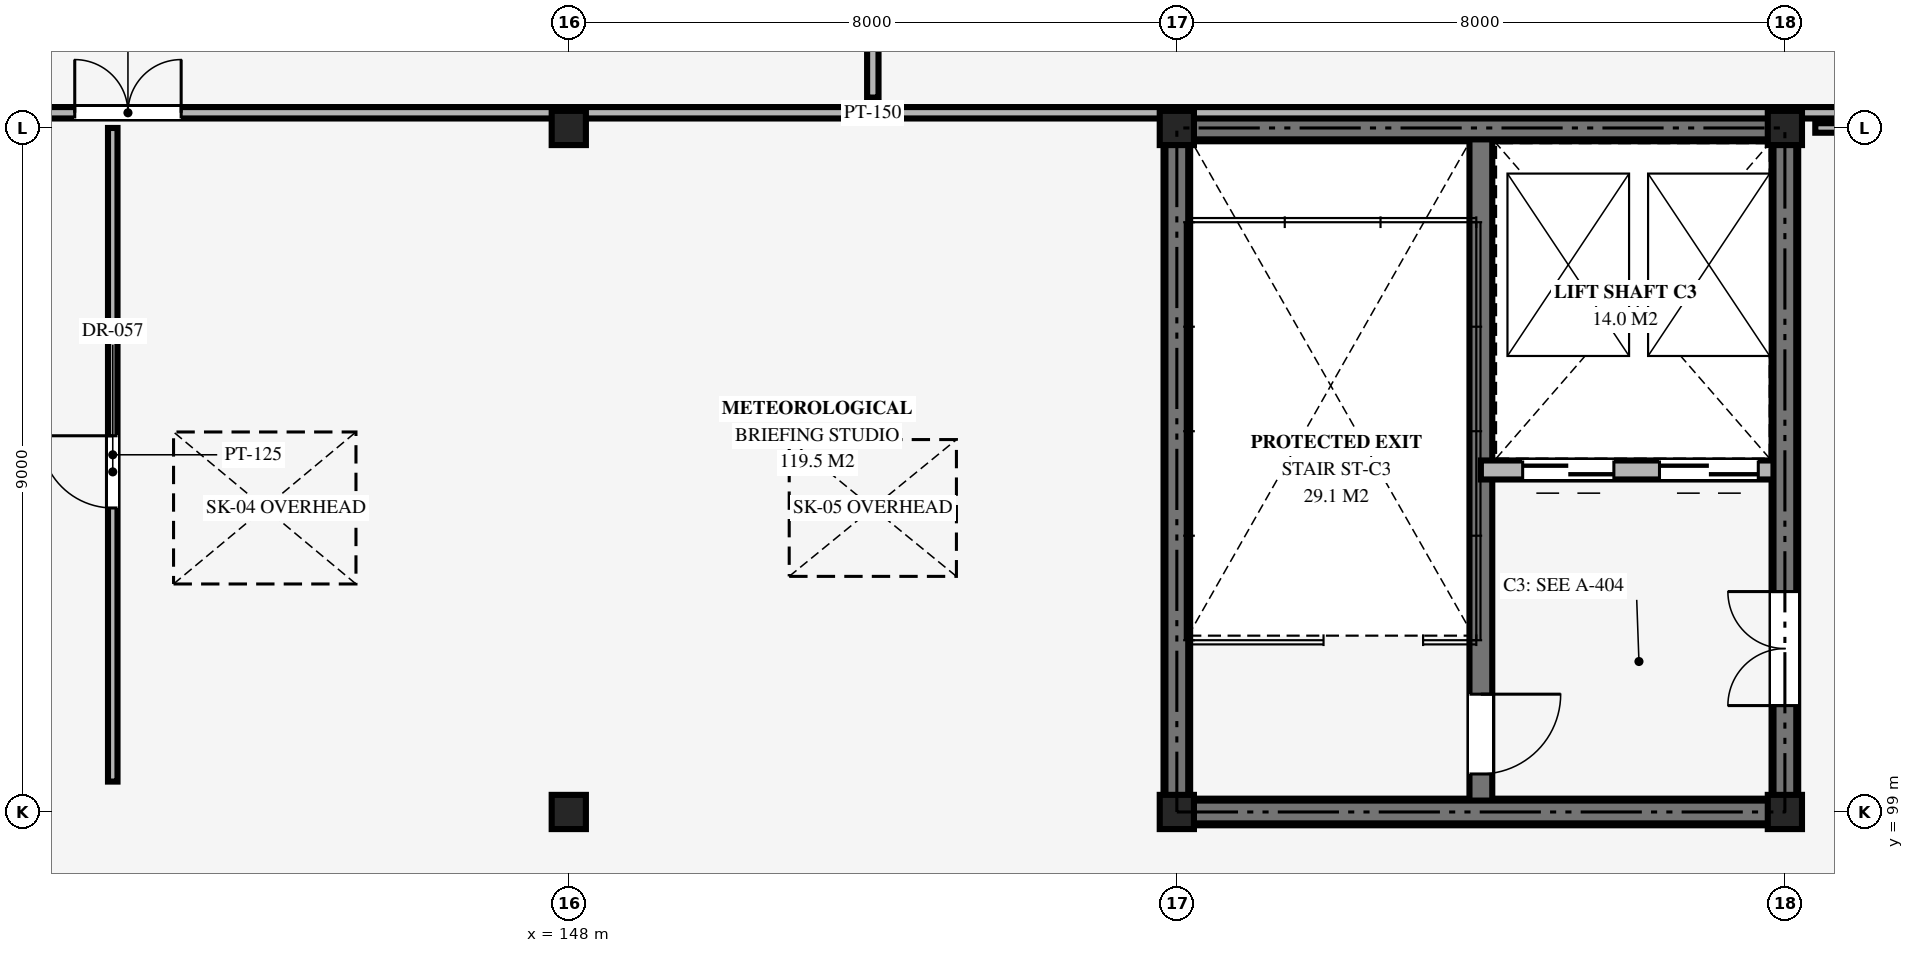
"""IFC4 building model, lengths in metres.
Left out: names, types, materials, properties, quantities, classifications, styles, units other than length and angle.
Written with IfcOpenShell. Run it as: python <this file> out.ifc"""

import sys

from ifc_helpers import new_model, si_unit, direction, frame, frame_2d, origin, origin_2d, place, context, subcontext, project, spatial, rectangle, extrude, element, fill, save


model = new_model("IFC4")
c1 = context("Model", 3, precision=1e-05, world=origin(), true_north=direction((0.0, 1.0)))
c2 = subcontext(c1, "Body", "Model", "MODEL_VIEW")
j1 = project(units=[si_unit("LENGTHUNIT", "METRE"), si_unit("PLANEANGLEUNIT", "RADIAN")], contexts=[c1])
p1 = place(None, origin())
s1 = spatial("IfcSite", under=j1, at=p1, CompositionType="ELEMENT")
p2 = place(p1, origin())
s2 = spatial("IfcBuilding", under=s1, at=p2, CompositionType="ELEMENT")
p3 = place(p2, frame((0.0, 0.0, 23.7)))
s3 = spatial("IfcBuildingStorey", under=s2, at=p3, CompositionType="ELEMENT", Elevation=23.7)
for number, where, z_axis, x_axis in (
    (1, (148.0, 99.0, 0.0), (0.0, 0.0, 1.0), (1.0, 0.0, 0.0)),
    (2, (148.0, 108.0, 0.0), (0.0, 0.0, 1.0), (1.0, 0.0, 0.0)),
    (3, (156.0, 99.0, 0.0), (0.0, 0.0, 1.0), (1.0, 0.0, 0.0)),
    (4, (156.0, 108.0, 0.0), (0.0, 0.0, 1.0), (1.0, 0.0, 0.0)),
    (5, (164.0, 99.0, 0.0), (0.0, 0.0, 1.0), (1.0, 0.0, 0.0)),
    (6, (164.0, 108.0, 0.0), (0.0, 0.0, 1.0), (1.0, 0.0, 0.0)),
):
    element("IfcColumn", number, at=place(p3, frame(where, z_axis=z_axis, x_axis=x_axis)), inside=s3, PredefinedType="COLUMN", context=c2, shape_type="SweptSolid", body=[
        extrude(rectangle(XDim=0.45, YDim=0.45, at=origin_2d()), origin(), (0.0, 0.0, 1.0), 4.04),
    ])
for number, where, z_axis, x_axis in (
    (7, (156.0, 99.0, 0.0), (0.0, 0.0, 1.0), (1.0, 0.0, 0.0)),
    (8, (156.0, 108.0, 0.0), (0.0, 0.0, 1.0), (1.0, 0.0, 0.0)),
):
    element("IfcWall", number, at=place(p3, frame(where, z_axis=z_axis, x_axis=x_axis)), inside=s3, PredefinedType="SHEAR", context=c2, shape_type="SweptSolid", body=[
        extrude(rectangle(XDim=8.0, YDim=0.35, at=frame_2d((4.0, 0.0))), origin(), (0.0, 0.0, 1.0), 3.98),
    ])
p4 = place(p3, frame((156.0, 99.0, 0.0), z_axis=(0.0, 0.0, 1.0), x_axis=(0.0, 1.0, 0.0)))
e9 = element("IfcWall", 9, at=p4, inside=s3, PredefinedType="SHEAR", context=c2, shape_type="SweptSolid", body=[
    extrude(rectangle(XDim=9.0, YDim=0.35, at=frame_2d((4.5, 0.0))), origin(), (0.0, 0.0, 1.0), 3.98),
])
p5 = place(p3, frame((164.0, 99.0, 0.0), z_axis=(0.0, 0.0, 1.0), x_axis=(0.0, 1.0, 0.0)))
e10 = element("IfcWall", 10, at=p5, inside=s3, PredefinedType="SHEAR", context=c2, shape_type="SweptSolid", body=[
    extrude(rectangle(XDim=9.0, YDim=0.35, at=frame_2d((4.5, 0.0))), origin(), (0.0, 0.0, 1.0), 3.98),
])
p6 = place(p5, frame((1.4, 0.0, 0.0)))
e11 = element("IfcOpeningElement", 11, at=p6, cuts=e10, PredefinedType="OPENING", context=c2, shape_type="SweptSolid", body=[
    extrude(rectangle(XDim=1.5, YDim=2.2, at=frame_2d((0.75, 1.1))), frame((0.0, 0.185, 0.0), z_axis=(0.0, -1.0, 0.0), x_axis=(1.0, 0.0, 0.0)), (0.0, 0.0, 1.0), 0.37),
])
p7 = place(p3, frame((160.0, 108.0, 0.0), z_axis=(0.0, 0.0, 1.0), x_axis=(0.0, -1.0, 0.0)))
e12 = element("IfcWall", 12, at=p7, inside=s3, PredefinedType="SHEAR", context=c2, shape_type="SweptSolid", body=[
    extrude(rectangle(XDim=9.0, YDim=0.3, at=frame_2d((4.5, 0.0))), origin(), (0.0, 0.0, 1.0), 3.98),
])
p8 = place(p7, frame((7.45, 0.0, 0.0)))
e13 = element("IfcOpeningElement", 13, at=p8, cuts=e12, PredefinedType="OPENING", context=c2, shape_type="SweptSolid", body=[
    extrude(rectangle(XDim=1.05, YDim=2.15, at=frame_2d((0.525, 1.075))), frame((0.0, 0.16, 0.0), z_axis=(0.0, -1.0, 0.0), x_axis=(1.0, 0.0, 0.0)), (0.0, 0.0, 1.0), 0.32),
])
p9 = place(p3, frame((164.0, 103.5, 0.0), z_axis=(0.0, 0.0, 1.0), x_axis=(-1.0, 0.0, 0.0)))
e14 = element("IfcWall", 14, at=p9, inside=s3, PredefinedType="SOLIDWALL", context=c2, shape_type="SweptSolid", body=[
    extrude(rectangle(XDim=4.0, YDim=0.25, at=frame_2d((2.0, 0.0))), origin(), (0.0, 0.0, 1.0), 3.25),
])
p10 = place(p9, frame((0.35, 0.0, 0.0)))
e15 = element("IfcOpeningElement", 15, at=p10, cuts=e14, PredefinedType="OPENING", context=c2, shape_type="SweptSolid", body=[
    extrude(rectangle(XDim=1.3, YDim=2.25, at=frame_2d((0.65, 1.125))), frame((0.0, 0.135, 0.0), z_axis=(0.0, -1.0, 0.0), x_axis=(1.0, 0.0, 0.0)), (0.0, 0.0, 1.0), 0.27),
])
p11 = place(p9, frame((2.25, 0.0, 0.0)))
e16 = element("IfcOpeningElement", 16, at=p11, cuts=e14, PredefinedType="OPENING", context=c2, shape_type="SweptSolid", body=[
    extrude(rectangle(XDim=1.2, YDim=2.2, at=frame_2d((0.6, 1.1))), frame((0.0, 0.135, 0.0), z_axis=(0.0, -1.0, 0.0), x_axis=(1.0, 0.0, 0.0)), (0.0, 0.0, 1.0), 0.27),
])
for number, where, z_axis, x_axis in (
    (17, (156.0, 99.0, 3.98), (0.0, 0.0, 1.0), (1.0, 0.0, 0.0)),
    (18, (156.0, 108.0, 3.98), (0.0, 0.0, 1.0), (1.0, 0.0, 0.0)),
):
    element("IfcWall", number, at=place(p3, frame(where, z_axis=z_axis, x_axis=x_axis)), inside=s3, PredefinedType="SHEAR", context=c2, shape_type="SweptSolid", body=[
        extrude(rectangle(XDim=8.0, YDim=0.3, at=frame_2d((4.0, 0.0))), origin(), (0.0, 0.0, 1.0), 1.84),
    ])
for number, where, z_axis, x_axis in (
    (19, (156.0, 99.0, 3.98), (0.0, 0.0, 1.0), (0.0, 1.0, 0.0)),
    (20, (164.0, 99.0, 3.98), (0.0, 0.0, 1.0), (0.0, 1.0, 0.0)),
):
    element("IfcWall", number, at=place(p3, frame(where, z_axis=z_axis, x_axis=x_axis)), inside=s3, PredefinedType="SHEAR", context=c2, shape_type="SweptSolid", body=[
        extrude(rectangle(XDim=9.0, YDim=0.3, at=frame_2d((4.5, 0.0))), origin(), (0.0, 0.0, 1.0), 1.84),
    ])
p12 = place(p3, frame((152.0, 108.4, 0.0), z_axis=(0.0, 0.0, 1.0), x_axis=(0.0, 1.0, 0.0)))
e21 = element("IfcWall", 21, at=p12, inside=s3, PredefinedType="PARTITIONING", context=c2, shape_type="SweptSolid", body=[
    extrude(rectangle(XDim=11.2, YDim=0.15, at=frame_2d((5.6, 0.0))), origin(), (0.0, 0.0, 1.0), 3.25),
])
p13 = place(p12, frame((4.8, 0.0, 0.0)))
e22 = element("IfcOpeningElement", 22, at=p13, cuts=e21, PredefinedType="OPENING", context=c2, shape_type="SweptSolid", body=[
    extrude(rectangle(XDim=1.0, YDim=2.15, at=frame_2d((0.5, 1.075))), frame((0.0, 0.085, 0.0), z_axis=(0.0, -1.0, 0.0), x_axis=(1.0, 0.0, 0.0)), (0.0, 0.0, 1.0), 0.17),
])
p14 = place(p3, frame((132.6, 108.2, 0.0), z_axis=(0.0, 0.0, 1.0), x_axis=(1.0, 0.0, 0.0)))
e23 = element("IfcWall", 23, at=p14, inside=s3, PredefinedType="PARTITIONING", context=c2, shape_type="SweptSolid", body=[
    extrude(rectangle(XDim=38.8, YDim=0.15, at=frame_2d((19.4, 0.0))), origin(), (0.0, 0.0, 1.0), 3.25),
])
p15 = place(p14, frame((8.9, 0.0, 0.0)))
e24 = element("IfcOpeningElement", 24, at=p15, cuts=e23, PredefinedType="OPENING", context=c2, shape_type="SweptSolid", body=[
    extrude(rectangle(XDim=1.4, YDim=2.15, at=frame_2d((0.7, 1.075))), frame((0.0, 0.085, 0.0), z_axis=(0.0, -1.0, 0.0), x_axis=(1.0, 0.0, 0.0)), (0.0, 0.0, 1.0), 0.17),
])
p16 = place(p3, frame((142.0, 99.4, 0.0), z_axis=(0.0, 0.0, 1.0), x_axis=(0.0, 1.0, 0.0)))
e25 = element("IfcWall", 25, at=p16, inside=s3, PredefinedType="PARTITIONING", context=c2, shape_type="SweptSolid", body=[
    extrude(rectangle(XDim=8.6, YDim=0.125, at=frame_2d((4.3, 0.0))), origin(), (0.0, 0.0, 1.0), 3.25),
])
p17 = place(p16, frame((3.6, 0.0, 0.0)))
e26 = element("IfcOpeningElement", 26, at=p17, cuts=e25, PredefinedType="OPENING", context=c2, shape_type="SweptSolid", body=[
    extrude(rectangle(XDim=0.95, YDim=2.1, at=frame_2d((0.475, 1.05))), frame((0.0, 0.073, 0.0), z_axis=(0.0, -1.0, 0.0), x_axis=(1.0, 0.0, 0.0)), (0.0, 0.0, 1.0), 0.145),
])
p18 = place(p3, frame((164.4, 108.0, 0.0), z_axis=(0.0, 0.0, 1.0), x_axis=(1.0, 0.0, 0.0)))
e27 = element("IfcWall", 27, at=p18, inside=s3, PredefinedType="PARTITIONING", context=c2, shape_type="SweptSolid", body=[
    extrude(rectangle(XDim=7.0, YDim=0.125, at=frame_2d((3.5, 0.0))), origin(), (0.0, 0.0, 1.0), 3.25),
])
p19 = place(p2, frame((0.0, 0.0, 27.9)))
p20 = place(p19, frame((0.0, 0.0, -0.22)))
p21 = place(p20, frame((144.0, 103.0, 0.0)))
p22 = place(p21, frame((0.0, 0.0, 0.17)))
e28 = element("IfcWindow", 28, at=p22, inside=s3, PartitioningType="SINGLE_PANEL", PredefinedType="SKYLIGHT", context=c2, shape_type="SweptSolid", body=[
    extrude(rectangle(XDim=2.4, YDim=2.0, at=origin_2d()), origin(), (0.0, 0.0, 1.0), 0.05),
])
p23 = place(p20, frame((152.0, 103.0, 0.0)))
p24 = place(p23, frame((0.0, 0.0, 0.17)))
e29 = element("IfcWindow", 29, at=p24, inside=s3, PartitioningType="SINGLE_PANEL", PredefinedType="SKYLIGHT", context=c2, shape_type="SweptSolid", body=[
    extrude(rectangle(XDim=2.2, YDim=1.8, at=origin_2d()), origin(), (0.0, 0.0, 1.0), 0.05),
])
p25 = place(p10, origin())
e30 = element("IfcDoor", 30, at=p25, inside=s3, OperationType="DOUBLE_DOOR_SLIDING", PredefinedType="USERDEFINED", context=c2, shape_type="SweptSolid", body=[
    extrude(rectangle(XDim=1.3, YDim=2.25, at=frame_2d((0.65, 1.125))), frame((0.0, 0.025, 0.0), z_axis=(0.0, -1.0, 0.0), x_axis=(1.0, 0.0, 0.0)), (0.0, 0.0, 1.0), 0.05),
])
fill(e15, e30)
p26 = place(p11, origin())
e31 = element("IfcDoor", 31, at=p26, inside=s3, OperationType="DOUBLE_DOOR_SLIDING", PredefinedType="USERDEFINED", context=c2, shape_type="SweptSolid", body=[
    extrude(rectangle(XDim=1.2, YDim=2.2, at=frame_2d((0.6, 1.1))), frame((0.0, 0.025, 0.0), z_axis=(0.0, -1.0, 0.0), x_axis=(1.0, 0.0, 0.0)), (0.0, 0.0, 1.0), 0.05),
])
fill(e16, e31)
p27 = place(p8, origin())
e32 = element("IfcDoor", 32, at=p27, inside=s3, OperationType="SINGLE_SWING_LEFT", PredefinedType="DOOR", context=c2, shape_type="SweptSolid", body=[
    extrude(rectangle(XDim=1.05, YDim=2.15, at=frame_2d((0.525, 1.075))), frame((0.0, 0.025, 0.0), z_axis=(0.0, -1.0, 0.0), x_axis=(1.0, 0.0, 0.0)), (0.0, 0.0, 1.0), 0.05),
])
fill(e13, e32)
p28 = place(p6, origin())
e33 = element("IfcDoor", 33, at=p28, inside=s3, OperationType="DOUBLE_DOOR_SINGLE_SWING", PredefinedType="DOOR", context=c2, shape_type="SweptSolid", body=[
    extrude(rectangle(XDim=1.5, YDim=2.2, at=frame_2d((0.75, 1.1))), frame((0.0, 0.025, 0.0), z_axis=(0.0, -1.0, 0.0), x_axis=(1.0, 0.0, 0.0)), (0.0, 0.0, 1.0), 0.05),
])
fill(e11, e33)
p29 = place(p15, origin())
e34 = element("IfcDoor", 34, at=p29, inside=s3, OperationType="DOUBLE_DOOR_SINGLE_SWING", PredefinedType="DOOR", context=c2, shape_type="SweptSolid", body=[
    extrude(rectangle(XDim=1.4, YDim=2.15, at=frame_2d((0.7, 1.075))), frame((0.0, 0.025, 0.0), z_axis=(0.0, -1.0, 0.0), x_axis=(1.0, 0.0, 0.0)), (0.0, 0.0, 1.0), 0.05),
])
fill(e24, e34)
p30 = place(p17, origin())
e35 = element("IfcDoor", 35, at=p30, inside=s3, OperationType="SINGLE_SWING_RIGHT", PredefinedType="DOOR", context=c2, shape_type="SweptSolid", body=[
    extrude(rectangle(XDim=0.95, YDim=2.1, at=frame_2d((0.475, 1.05))), frame((0.0, 0.025, 0.0), z_axis=(0.0, -1.0, 0.0), x_axis=(1.0, 0.0, 0.0)), (0.0, 0.0, 1.0), 0.05),
])
fill(e26, e35)
save(model, sys.argv[1])
